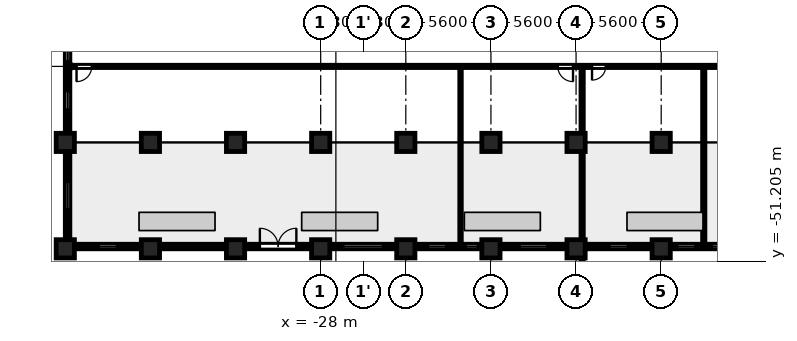
"""IFC4 building model, lengths in metres.
Left out: names, types, materials, properties, quantities, classifications, styles, units other than length and angle.
Written with IfcOpenShell. Run it as: python <this file> out.ifc"""

import sys

from ifc_helpers import new_model, si_unit, direction, frame, frame_2d, origin, origin_2d, place, context, subcontext, project, spatial, rectangle, circle, extrude, element, fill, save


model = new_model("IFC4")
c1 = context("Model", 3, precision=1e-05, world=origin(), true_north=direction((0.0, 1.0)))
c2 = subcontext(c1, "Body", "Model", "MODEL_VIEW")
j1 = project(units=[si_unit("LENGTHUNIT", "METRE"), si_unit("PLANEANGLEUNIT", "RADIAN")], contexts=[c1])
p1 = place(None, origin())
s1 = spatial("IfcSite", under=j1, at=p1, CompositionType="ELEMENT")
p2 = place(p1, origin())
s2 = spatial("IfcBuilding", under=s1, at=p2, CompositionType="ELEMENT")
p3 = place(p2, frame((0.0, 0.0, 11.3)))
s3 = spatial("IfcBuildingStorey", under=s2, at=p3, CompositionType="ELEMENT", Elevation=11.3)
for number, where, z_axis, x_axis in (
    (1, (-44.8, -43.4, 0.0), (0.0, 0.0, 1.0), (1.0, 0.0, 0.0)),
    (2, (-39.2, -43.4, 0.0), (0.0, 0.0, 1.0), (1.0, 0.0, 0.0)),
    (3, (-33.6, -43.4, 0.0), (0.0, 0.0, 1.0), (1.0, 0.0, 0.0)),
    (4, (-28.0, -43.4, 0.0), (0.0, 0.0, 1.0), (1.0, 0.0, 0.0)),
    (5, (-22.4, -43.4, 0.0), (0.0, 0.0, 1.0), (1.0, 0.0, 0.0)),
    (6, (-16.8, -43.4, 0.0), (0.0, 0.0, 1.0), (1.0, 0.0, 0.0)),
    (7, (-11.2, -43.4, 0.0), (0.0, 0.0, 1.0), (1.0, 0.0, 0.0)),
    (8, (-5.6, -43.4, 0.0), (0.0, 0.0, 1.0), (1.0, 0.0, 0.0)),
    (9, (-44.8, -50.4, 0.0), (0.0, 0.0, 1.0), (1.0, 0.0, 0.0)),
    (10, (-39.2, -50.4, 0.0), (0.0, 0.0, 1.0), (1.0, 0.0, 0.0)),
    (11, (-33.6, -50.4, 0.0), (0.0, 0.0, 1.0), (1.0, 0.0, 0.0)),
    (12, (-28.0, -50.4, 0.0), (0.0, 0.0, 1.0), (1.0, 0.0, 0.0)),
    (13, (-22.4, -50.4, 0.0), (0.0, 0.0, 1.0), (1.0, 0.0, 0.0)),
    (14, (-16.8, -50.4, 0.0), (0.0, 0.0, 1.0), (1.0, 0.0, 0.0)),
    (15, (-11.2, -50.4, 0.0), (0.0, 0.0, 1.0), (1.0, 0.0, 0.0)),
    (16, (-5.6, -50.4, 0.0), (0.0, 0.0, 1.0), (1.0, 0.0, 0.0)),
):
    element("IfcColumn", number, at=place(p3, frame(where, z_axis=z_axis, x_axis=x_axis)), inside=s3, PredefinedType="COLUMN", context=c2, shape_type="SweptSolid", body=[
        extrude(circle(Radius=0.6, at=origin_2d()), origin(), (0.0, 0.0, 1.0), 4.8),
    ])
p4 = place(p3, frame((-44.65, -37.0, 0.0), z_axis=(0.0, 0.0, 1.0), x_axis=(0.0, -1.0, 0.0)))
e17 = element("IfcWall", 17, at=p4, inside=s3, PredefinedType="SOLIDWALL", context=c2, shape_type="SweptSolid", body=[
    extrude(rectangle(XDim=5.8, YDim=0.3, at=frame_2d((2.9, 0.0))), origin(), (0.0, 0.0, 1.0), 3.65),
])
p5 = place(p4, frame((0.262, 0.0, 0.6)))
e18 = element("IfcOpeningElement", 18, at=p5, cuts=e17, PredefinedType="OPENING", context=c2, shape_type="SweptSolid", body=[
    extrude(rectangle(XDim=0.8, YDim=1.55, at=frame_2d((0.4, 0.775))), frame((0.0, 0.16, 0.0), z_axis=(0.0, -1.0, 0.0), x_axis=(1.0, 0.0, 0.0)), (0.0, 0.0, 1.0), 0.32),
])
p6 = place(p4, frame((3.038, 0.0, 0.6)))
e19 = element("IfcOpeningElement", 19, at=p6, cuts=e17, PredefinedType="OPENING", context=c2, shape_type="SweptSolid", body=[
    extrude(rectangle(XDim=1.2, YDim=1.55, at=frame_2d((0.6, 0.775))), frame((0.0, 0.16, 0.0), z_axis=(0.0, -1.0, 0.0), x_axis=(1.0, 0.0, 0.0)), (0.0, 0.0, 1.0), 0.32),
])
p7 = place(p3, frame((-44.65, -44.0, 0.0), z_axis=(0.0, 0.0, 1.0), x_axis=(0.0, -1.0, 0.0)))
e20 = element("IfcWall", 20, at=p7, inside=s3, PredefinedType="SOLIDWALL", context=c2, shape_type="SweptSolid", body=[
    extrude(rectangle(XDim=5.8, YDim=0.3, at=frame_2d((2.9, 0.0))), origin(), (0.0, 0.0, 1.0), 3.65),
])
p8 = place(p7, frame((2.0, 0.0, 0.9)))
e21 = element("IfcOpeningElement", 21, at=p8, cuts=e20, PredefinedType="OPENING", context=c2, shape_type="SweptSolid", body=[
    extrude(rectangle(XDim=1.8, YDim=1.25, at=frame_2d((0.9, 0.625))), frame((0.0, 0.16, 0.0), z_axis=(0.0, -1.0, 0.0), x_axis=(1.0, 0.0, 0.0)), (0.0, 0.0, 1.0), 0.32),
])
p9 = place(p3, frame((-44.2, -50.25, 0.0), z_axis=(0.0, 0.0, 1.0), x_axis=(1.0, 0.0, 0.0)))
e22 = element("IfcWall", 22, at=p9, inside=s3, PredefinedType="SOLIDWALL", context=c2, shape_type="SweptSolid", body=[
    extrude(rectangle(XDim=4.4, YDim=0.3, at=frame_2d((2.2, 0.0))), origin(), (0.0, 0.0, 1.0), 3.65),
])
p10 = place(p9, frame((1.6, 0.0, 0.6)))
e23 = element("IfcOpeningElement", 23, at=p10, cuts=e22, PredefinedType="OPENING", context=c2, shape_type="SweptSolid", body=[
    extrude(rectangle(XDim=1.2, YDim=1.55, at=frame_2d((0.6, 0.775))), frame((0.0, 0.16, 0.0), z_axis=(0.0, -1.0, 0.0), x_axis=(1.0, 0.0, 0.0)), (0.0, 0.0, 1.0), 0.32),
])
p11 = place(p3, frame((-38.6, -50.25, 0.0), z_axis=(0.0, 0.0, 1.0), x_axis=(1.0, 0.0, 0.0)))
e24 = element("IfcWall", 24, at=p11, inside=s3, PredefinedType="SOLIDWALL", context=c2, shape_type="SweptSolid", body=[
    extrude(rectangle(XDim=4.4, YDim=0.3, at=frame_2d((2.2, 0.0))), origin(), (0.0, 0.0, 1.0), 3.65),
])
p12 = place(p3, frame((-33.0, -50.25, 0.0), z_axis=(0.0, 0.0, 1.0), x_axis=(1.0, 0.0, 0.0)))
e25 = element("IfcWall", 25, at=p12, inside=s3, PredefinedType="SOLIDWALL", context=c2, shape_type="SweptSolid", body=[
    extrude(rectangle(XDim=4.4, YDim=0.3, at=frame_2d((2.2, 0.0))), origin(), (0.0, 0.0, 1.0), 3.65),
])
p13 = place(p12, frame((1.0, 0.0, 0.0)))
e26 = element("IfcOpeningElement", 26, at=p13, cuts=e25, PredefinedType="OPENING", context=c2, shape_type="SweptSolid", body=[
    extrude(rectangle(XDim=2.4, YDim=2.3, at=frame_2d((1.2, 1.15))), frame((0.0, 0.16, 0.0), z_axis=(0.0, -1.0, 0.0), x_axis=(1.0, 0.0, 0.0)), (0.0, 0.0, 1.0), 0.32),
])
p14 = place(p3, frame((-27.4, -50.25, 0.0), z_axis=(0.0, 0.0, 1.0), x_axis=(1.0, 0.0, 0.0)))
e27 = element("IfcWall", 27, at=p14, inside=s3, PredefinedType="SOLIDWALL", context=c2, shape_type="SweptSolid", body=[
    extrude(rectangle(XDim=4.4, YDim=0.3, at=frame_2d((2.2, 0.0))), origin(), (0.0, 0.0, 1.0), 3.65),
])
p15 = place(p14, frame((0.9, 0.0, 0.9)))
e28 = element("IfcOpeningElement", 28, at=p15, cuts=e27, PredefinedType="OPENING", context=c2, shape_type="SweptSolid", body=[
    extrude(rectangle(XDim=2.6, YDim=1.25, at=frame_2d((1.3, 0.625))), frame((0.0, 0.16, 0.0), z_axis=(0.0, -1.0, 0.0), x_axis=(1.0, 0.0, 0.0)), (0.0, 0.0, 1.0), 0.32),
])
p16 = place(p3, frame((-21.8, -50.25, 0.0), z_axis=(0.0, 0.0, 1.0), x_axis=(1.0, 0.0, 0.0)))
e29 = element("IfcWall", 29, at=p16, inside=s3, PredefinedType="SOLIDWALL", context=c2, shape_type="SweptSolid", body=[
    extrude(rectangle(XDim=4.4, YDim=0.3, at=frame_2d((2.2, 0.0))), origin(), (0.0, 0.0, 1.0), 3.65),
])
p17 = place(p16, frame((0.863, 0.0, 0.6)))
e30 = element("IfcOpeningElement", 30, at=p17, cuts=e29, PredefinedType="OPENING", context=c2, shape_type="SweptSolid", body=[
    extrude(rectangle(XDim=1.2, YDim=1.55, at=frame_2d((0.6, 0.775))), frame((0.0, 0.16, 0.0), z_axis=(0.0, -1.0, 0.0), x_axis=(1.0, 0.0, 0.0)), (0.0, 0.0, 1.0), 0.32),
])
p18 = place(p16, frame((3.337, 0.0, 0.6)))
e31 = element("IfcOpeningElement", 31, at=p18, cuts=e29, PredefinedType="OPENING", context=c2, shape_type="SweptSolid", body=[
    extrude(rectangle(XDim=0.8, YDim=1.55, at=frame_2d((0.4, 0.775))), frame((0.0, 0.16, 0.0), z_axis=(0.0, -1.0, 0.0), x_axis=(1.0, 0.0, 0.0)), (0.0, 0.0, 1.0), 0.32),
])
p19 = place(p3, frame((-16.2, -50.25, 0.0), z_axis=(0.0, 0.0, 1.0), x_axis=(1.0, 0.0, 0.0)))
e32 = element("IfcWall", 32, at=p19, inside=s3, PredefinedType="SOLIDWALL", context=c2, shape_type="SweptSolid", body=[
    extrude(rectangle(XDim=4.4, YDim=0.3, at=frame_2d((2.2, 0.0))), origin(), (0.0, 0.0, 1.0), 3.65),
])
p20 = place(p19, frame((1.3, 0.0, 0.9)))
e33 = element("IfcOpeningElement", 33, at=p20, cuts=e32, PredefinedType="OPENING", context=c2, shape_type="SweptSolid", body=[
    extrude(rectangle(XDim=1.8, YDim=1.25, at=frame_2d((0.9, 0.625))), frame((0.0, 0.16, 0.0), z_axis=(0.0, -1.0, 0.0), x_axis=(1.0, 0.0, 0.0)), (0.0, 0.0, 1.0), 0.32),
])
p21 = place(p3, frame((-10.6, -50.25, 0.0), z_axis=(0.0, 0.0, 1.0), x_axis=(1.0, 0.0, 0.0)))
e34 = element("IfcWall", 34, at=p21, inside=s3, PredefinedType="SOLIDWALL", context=c2, shape_type="SweptSolid", body=[
    extrude(rectangle(XDim=4.4, YDim=0.3, at=frame_2d((2.2, 0.0))), origin(), (0.0, 0.0, 1.0), 3.65),
])
p22 = place(p21, frame((1.6, 0.0, 0.6)))
e35 = element("IfcOpeningElement", 35, at=p22, cuts=e34, PredefinedType="OPENING", context=c2, shape_type="SweptSolid", body=[
    extrude(rectangle(XDim=1.2, YDim=1.55, at=frame_2d((0.6, 0.775))), frame((0.0, 0.16, 0.0), z_axis=(0.0, -1.0, 0.0), x_axis=(1.0, 0.0, 0.0)), (0.0, 0.0, 1.0), 0.32),
])
p23 = place(p3, frame((-5.0, -50.25, 0.0), z_axis=(0.0, 0.0, 1.0), x_axis=(1.0, 0.0, 0.0)))
e36 = element("IfcWall", 36, at=p23, inside=s3, PredefinedType="SOLIDWALL", context=c2, shape_type="SweptSolid", body=[
    extrude(rectangle(XDim=4.4, YDim=0.3, at=frame_2d((2.2, 0.0))), origin(), (0.0, 0.0, 1.0), 3.65),
])
p24 = place(p23, frame((0.462, 0.0, 0.6)))
e37 = element("IfcOpeningElement", 37, at=p24, cuts=e36, PredefinedType="OPENING", context=c2, shape_type="SweptSolid", body=[
    extrude(rectangle(XDim=1.2, YDim=1.55, at=frame_2d((0.6, 0.775))), frame((0.0, 0.16, 0.0), z_axis=(0.0, -1.0, 0.0), x_axis=(1.0, 0.0, 0.0)), (0.0, 0.0, 1.0), 0.32),
])
p25 = place(p23, frame((2.738, 0.0, 0.6)))
e38 = element("IfcOpeningElement", 38, at=p25, cuts=e36, PredefinedType="OPENING", context=c2, shape_type="SweptSolid", body=[
    extrude(rectangle(XDim=1.2, YDim=1.55, at=frame_2d((0.6, 0.775))), frame((0.0, 0.16, 0.0), z_axis=(0.0, -1.0, 0.0), x_axis=(1.0, 0.0, 0.0)), (0.0, 0.0, 1.0), 0.32),
])
p26 = place(p3, frame((-44.48, -38.4, 0.0), z_axis=(0.0, 0.0, 1.0), x_axis=(1.0, 0.0, 0.0)))
e39 = element("IfcWall", 39, at=p26, inside=s3, PredefinedType="PARTITIONING", context=c2, shape_type="SweptSolid", body=[
    extrude(rectangle(XDim=88.96, YDim=0.15, at=frame_2d((44.48, 0.0))), origin(), (0.0, 0.0, 1.0), 4.45),
])
p27 = place(p26, frame((0.42, 0.0, 0.0)))
e40 = element("IfcOpeningElement", 40, at=p27, cuts=e39, PredefinedType="OPENING", context=c2, shape_type="SweptSolid", body=[
    extrude(rectangle(XDim=1.0, YDim=2.1, at=frame_2d((0.5, 1.05))), frame((0.0, 0.085, 0.0), z_axis=(0.0, -1.0, 0.0), x_axis=(1.0, 0.0, 0.0)), (0.0, 0.0, 1.0), 0.17),
])
p28 = place(p26, frame((32.08, 0.0, 0.0)))
e41 = element("IfcOpeningElement", 41, at=p28, cuts=e39, PredefinedType="OPENING", context=c2, shape_type="SweptSolid", body=[
    extrude(rectangle(XDim=1.0, YDim=2.1, at=frame_2d((0.5, 1.05))), frame((0.0, 0.085, 0.0), z_axis=(0.0, -1.0, 0.0), x_axis=(1.0, 0.0, 0.0)), (0.0, 0.0, 1.0), 0.17),
])
p29 = place(p26, frame((34.33, 0.0, 0.0)))
e42 = element("IfcOpeningElement", 42, at=p29, cuts=e39, PredefinedType="OPENING", context=c2, shape_type="SweptSolid", body=[
    extrude(rectangle(XDim=0.9, YDim=2.1, at=frame_2d((0.45, 1.05))), frame((0.0, 0.085, 0.0), z_axis=(0.0, -1.0, 0.0), x_axis=(1.0, 0.0, 0.0)), (0.0, 0.0, 1.0), 0.17),
])
p30 = place(p26, frame((87.58, 0.0, 0.0)))
e43 = element("IfcOpeningElement", 43, at=p30, cuts=e39, PredefinedType="OPENING", context=c2, shape_type="SweptSolid", body=[
    extrude(rectangle(XDim=1.0, YDim=2.1, at=frame_2d((0.5, 1.05))), frame((0.0, 0.085, 0.0), z_axis=(0.0, -1.0, 0.0), x_axis=(1.0, 0.0, 0.0)), (0.0, 0.0, 1.0), 0.17),
])
p31 = place(p3, frame((-18.8, -50.08, 0.0), z_axis=(0.0, 0.0, 1.0), x_axis=(0.0, 1.0, 0.0)))
e44 = element("IfcWall", 44, at=p31, inside=s3, PredefinedType="PARTITIONING", context=c2, shape_type="SweptSolid", body=[
    extrude(rectangle(XDim=11.605, YDim=0.1, at=frame_2d((5.802, 0.0))), origin(), (0.0, 0.0, 1.0), 4.45),
])
p32 = place(p3, frame((-10.8, -51.23, 0.0), z_axis=(0.0, 0.0, 1.0), x_axis=(0.0, 1.0, 0.0)))
e45 = element("IfcWall", 45, at=p32, inside=s3, PredefinedType="PARTITIONING", context=c2, shape_type="SweptSolid", body=[
    extrude(rectangle(XDim=12.755, YDim=0.15, at=frame_2d((6.377, 0.0))), origin(), (0.0, 0.0, 1.0), 4.45),
])
p33 = place(p3, frame((-2.8, -50.08, 0.0), z_axis=(0.0, 0.0, 1.0), x_axis=(0.0, 1.0, 0.0)))
e46 = element("IfcWall", 46, at=p33, inside=s3, PredefinedType="PARTITIONING", context=c2, shape_type="SweptSolid", body=[
    extrude(rectangle(XDim=11.605, YDim=0.15, at=frame_2d((5.802, 0.0))), origin(), (0.0, 0.0, 1.0), 4.45),
])
p34 = place(p13, origin())
e47 = element("IfcDoor", 47, at=p34, inside=s3, OperationType="SINGLE_SWING_LEFT", PredefinedType="DOOR", context=c2, shape_type="SweptSolid", body=[
    extrude(rectangle(XDim=2.4, YDim=2.3, at=frame_2d((1.2, 1.15))), frame((0.0, 0.025, 0.0), z_axis=(0.0, -1.0, 0.0), x_axis=(1.0, 0.0, 0.0)), (0.0, 0.0, 1.0), 0.05),
])
fill(e26, e47)
p35 = place(p27, origin())
e48 = element("IfcDoor", 48, at=p35, inside=s3, OperationType="SINGLE_SWING_LEFT", PredefinedType="DOOR", context=c2, shape_type="SweptSolid", body=[
    extrude(rectangle(XDim=1.0, YDim=2.1, at=frame_2d((0.5, 1.05))), frame((0.0, 0.025, 0.0), z_axis=(0.0, -1.0, 0.0), x_axis=(1.0, 0.0, 0.0)), (0.0, 0.0, 1.0), 0.05),
])
fill(e40, e48)
p36 = place(p28, origin())
e49 = element("IfcDoor", 49, at=p36, inside=s3, OperationType="SINGLE_SWING_RIGHT", PredefinedType="DOOR", context=c2, shape_type="SweptSolid", body=[
    extrude(rectangle(XDim=1.0, YDim=2.1, at=frame_2d((0.5, 1.05))), frame((0.0, 0.025, 0.0), z_axis=(0.0, -1.0, 0.0), x_axis=(1.0, 0.0, 0.0)), (0.0, 0.0, 1.0), 0.05),
])
fill(e41, e49)
p37 = place(p29, origin())
e50 = element("IfcDoor", 50, at=p37, inside=s3, OperationType="SINGLE_SWING_LEFT", PredefinedType="DOOR", context=c2, shape_type="SweptSolid", body=[
    extrude(rectangle(XDim=0.9, YDim=2.1, at=frame_2d((0.45, 1.05))), frame((0.0, 0.025, 0.0), z_axis=(0.0, -1.0, 0.0), x_axis=(1.0, 0.0, 0.0)), (0.0, 0.0, 1.0), 0.05),
])
fill(e42, e50)
p38 = place(p5, origin())
e51 = element("IfcWindow", 51, at=p38, inside=s3, PartitioningType="SINGLE_PANEL", PredefinedType="WINDOW", context=c2, shape_type="SweptSolid", body=[
    extrude(rectangle(XDim=0.8, YDim=1.55, at=frame_2d((0.4, 0.775))), frame((0.0, 0.03, 0.0), z_axis=(0.0, -1.0, 0.0), x_axis=(1.0, 0.0, 0.0)), (0.0, 0.0, 1.0), 0.06),
])
fill(e18, e51)
p39 = place(p6, origin())
e52 = element("IfcWindow", 52, at=p39, inside=s3, PartitioningType="SINGLE_PANEL", PredefinedType="WINDOW", context=c2, shape_type="SweptSolid", body=[
    extrude(rectangle(XDim=1.2, YDim=1.55, at=frame_2d((0.6, 0.775))), frame((0.0, 0.03, 0.0), z_axis=(0.0, -1.0, 0.0), x_axis=(1.0, 0.0, 0.0)), (0.0, 0.0, 1.0), 0.06),
])
fill(e19, e52)
p40 = place(p8, origin())
e53 = element("IfcWindow", 53, at=p40, inside=s3, PartitioningType="SINGLE_PANEL", PredefinedType="WINDOW", context=c2, shape_type="SweptSolid", body=[
    extrude(rectangle(XDim=1.8, YDim=1.25, at=frame_2d((0.9, 0.625))), frame((0.0, 0.03, 0.0), z_axis=(0.0, -1.0, 0.0), x_axis=(1.0, 0.0, 0.0)), (0.0, 0.0, 1.0), 0.06),
])
fill(e21, e53)
p41 = place(p10, origin())
e54 = element("IfcWindow", 54, at=p41, inside=s3, PartitioningType="SINGLE_PANEL", PredefinedType="WINDOW", context=c2, shape_type="SweptSolid", body=[
    extrude(rectangle(XDim=1.2, YDim=1.55, at=frame_2d((0.6, 0.775))), frame((0.0, 0.03, 0.0), z_axis=(0.0, -1.0, 0.0), x_axis=(1.0, 0.0, 0.0)), (0.0, 0.0, 1.0), 0.06),
])
fill(e23, e54)
p42 = place(p15, origin())
e55 = element("IfcWindow", 55, at=p42, inside=s3, PartitioningType="SINGLE_PANEL", PredefinedType="WINDOW", context=c2, shape_type="SweptSolid", body=[
    extrude(rectangle(XDim=2.6, YDim=1.25, at=frame_2d((1.3, 0.625))), frame((0.0, 0.03, 0.0), z_axis=(0.0, -1.0, 0.0), x_axis=(1.0, 0.0, 0.0)), (0.0, 0.0, 1.0), 0.06),
])
fill(e28, e55)
p43 = place(p17, origin())
e56 = element("IfcWindow", 56, at=p43, inside=s3, PartitioningType="SINGLE_PANEL", PredefinedType="WINDOW", context=c2, shape_type="SweptSolid", body=[
    extrude(rectangle(XDim=1.2, YDim=1.55, at=frame_2d((0.6, 0.775))), frame((0.0, 0.03, 0.0), z_axis=(0.0, -1.0, 0.0), x_axis=(1.0, 0.0, 0.0)), (0.0, 0.0, 1.0), 0.06),
])
fill(e30, e56)
p44 = place(p18, origin())
e57 = element("IfcWindow", 57, at=p44, inside=s3, PartitioningType="SINGLE_PANEL", PredefinedType="WINDOW", context=c2, shape_type="SweptSolid", body=[
    extrude(rectangle(XDim=0.8, YDim=1.55, at=frame_2d((0.4, 0.775))), frame((0.0, 0.03, 0.0), z_axis=(0.0, -1.0, 0.0), x_axis=(1.0, 0.0, 0.0)), (0.0, 0.0, 1.0), 0.06),
])
fill(e31, e57)
p45 = place(p20, origin())
e58 = element("IfcWindow", 58, at=p45, inside=s3, PartitioningType="SINGLE_PANEL", PredefinedType="WINDOW", context=c2, shape_type="SweptSolid", body=[
    extrude(rectangle(XDim=1.8, YDim=1.25, at=frame_2d((0.9, 0.625))), frame((0.0, 0.03, 0.0), z_axis=(0.0, -1.0, 0.0), x_axis=(1.0, 0.0, 0.0)), (0.0, 0.0, 1.0), 0.06),
])
fill(e33, e58)
p46 = place(p22, origin())
e59 = element("IfcWindow", 59, at=p46, inside=s3, PartitioningType="SINGLE_PANEL", PredefinedType="WINDOW", context=c2, shape_type="SweptSolid", body=[
    extrude(rectangle(XDim=1.2, YDim=1.55, at=frame_2d((0.6, 0.775))), frame((0.0, 0.03, 0.0), z_axis=(0.0, -1.0, 0.0), x_axis=(1.0, 0.0, 0.0)), (0.0, 0.0, 1.0), 0.06),
])
fill(e35, e59)
p47 = place(p24, origin())
e60 = element("IfcWindow", 60, at=p47, inside=s3, PartitioningType="SINGLE_PANEL", PredefinedType="WINDOW", context=c2, shape_type="SweptSolid", body=[
    extrude(rectangle(XDim=1.2, YDim=1.55, at=frame_2d((0.6, 0.775))), frame((0.0, 0.03, 0.0), z_axis=(0.0, -1.0, 0.0), x_axis=(1.0, 0.0, 0.0)), (0.0, 0.0, 1.0), 0.06),
])
fill(e37, e60)
p48 = place(p25, origin())
e61 = element("IfcWindow", 61, at=p48, inside=s3, PartitioningType="SINGLE_PANEL", PredefinedType="WINDOW", context=c2, shape_type="SweptSolid", body=[
    extrude(rectangle(XDim=1.2, YDim=1.55, at=frame_2d((0.6, 0.775))), frame((0.0, 0.03, 0.0), z_axis=(0.0, -1.0, 0.0), x_axis=(1.0, 0.0, 0.0)), (0.0, 0.0, 1.0), 0.06),
])
fill(e38, e61)
save(model, sys.argv[1])
